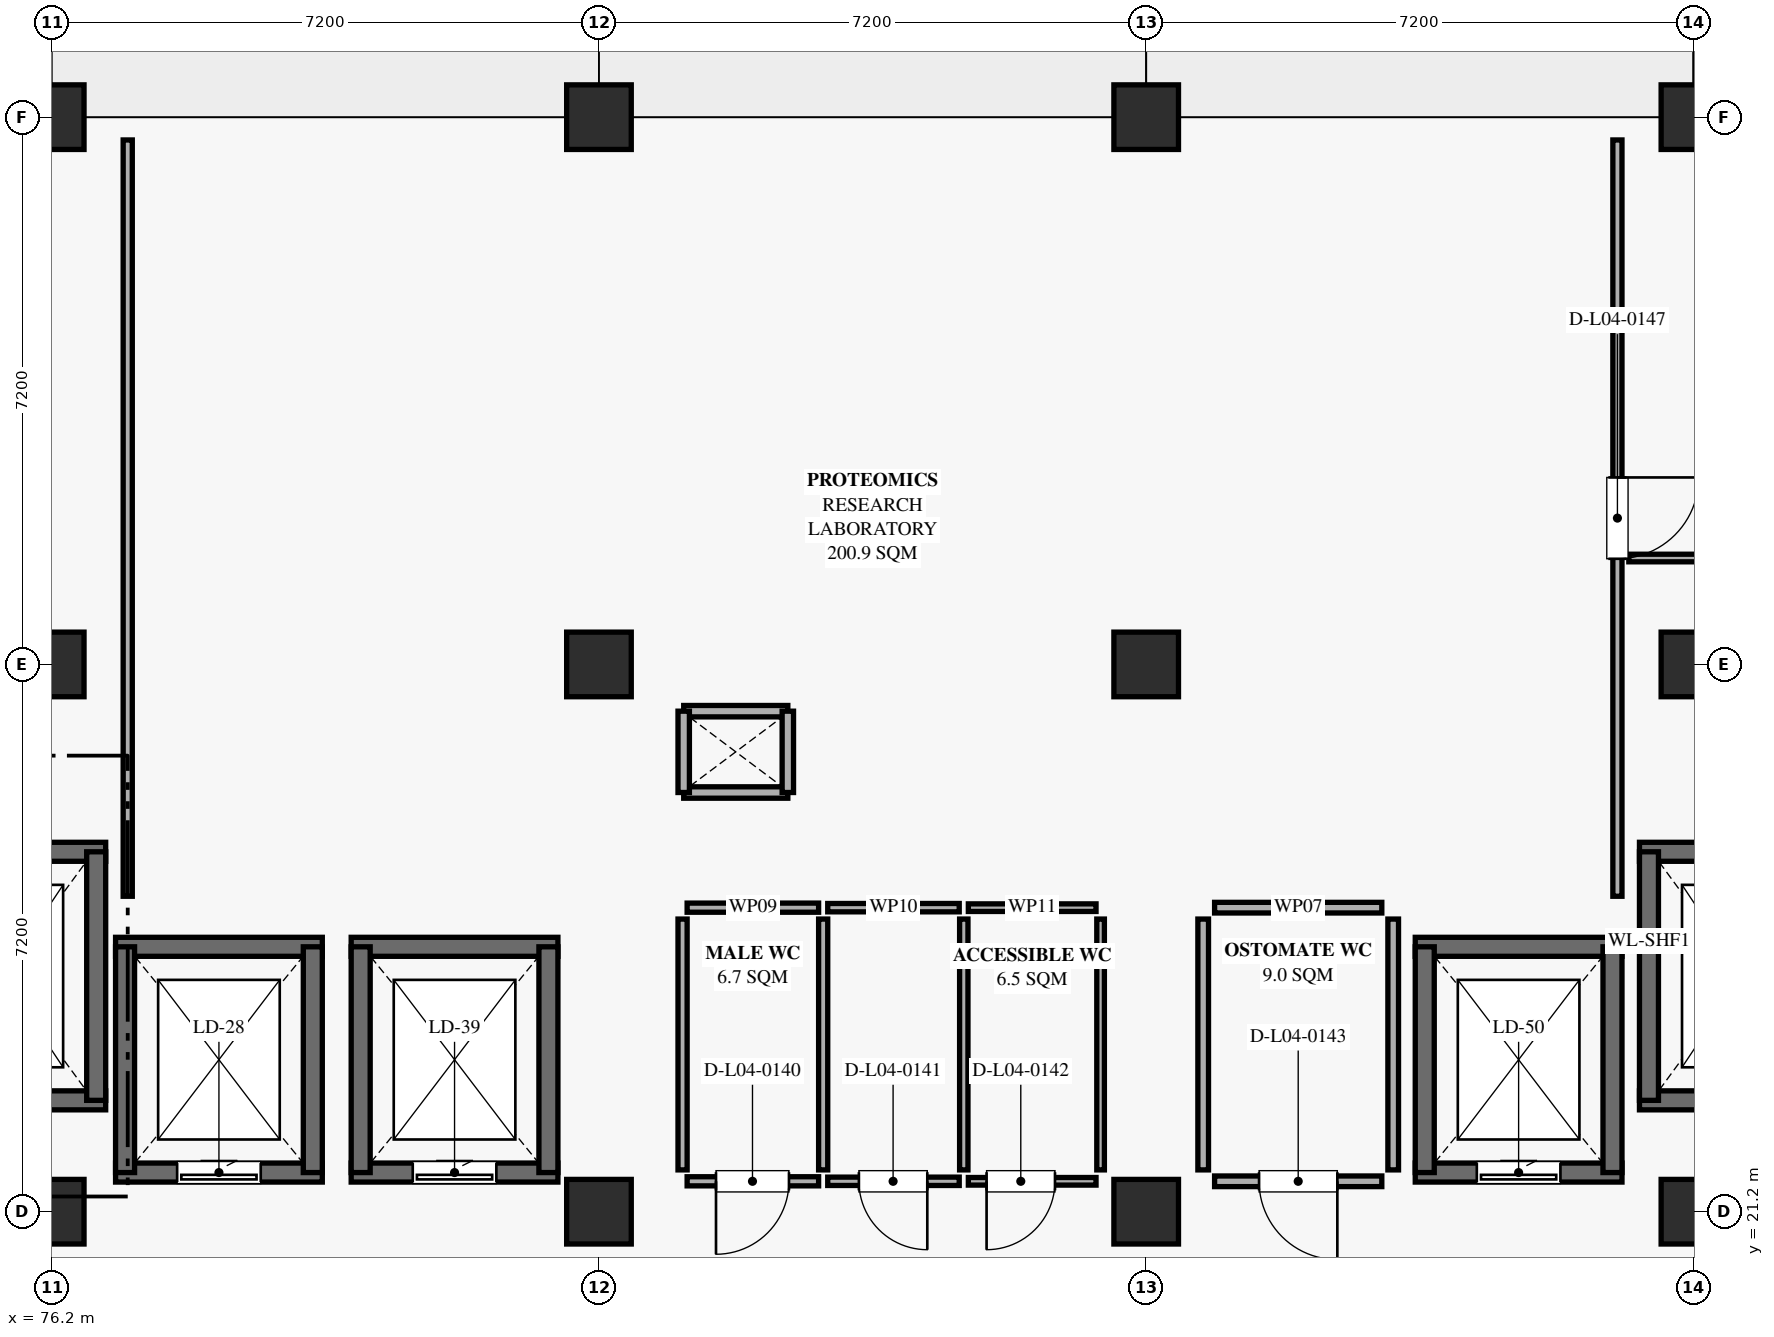
"""IFC4 building model, lengths in metres.
Left out: names, types, materials, properties, quantities, classifications, styles, units other than length and angle.
Written with IfcOpenShell. Run it as: python <this file> out.ifc"""

import sys

from ifc_helpers import new_model, si_unit, direction, frame, frame_2d, origin, origin_2d, place, context, subcontext, project, spatial, rectangle, extrude, element, fill, save


model = new_model("IFC4")
c1 = context("Model", 3, precision=1e-05, world=origin(), true_north=direction((0.0, 1.0)))
c2 = subcontext(c1, "Body", "Model", "MODEL_VIEW")
j1 = project(units=[si_unit("LENGTHUNIT", "METRE"), si_unit("PLANEANGLEUNIT", "RADIAN")], contexts=[c1])
p1 = place(None, origin())
s1 = spatial("IfcSite", under=j1, at=p1, CompositionType="ELEMENT")
p2 = place(p1, origin())
s2 = spatial("IfcBuilding", under=s1, at=p2, CompositionType="ELEMENT")
p3 = place(p2, frame((0.0, 0.0, 19.8)))
s3 = spatial("IfcBuildingStorey", under=s2, at=p3, CompositionType="ELEMENT", Elevation=19.8)
for number, where, z_axis, x_axis in (
    (1, (76.2, 21.2, 0.0), (0.0, 0.0, 1.0), (1.0, 0.0, 0.0)),
    (2, (83.4, 21.2, 0.0), (0.0, 0.0, 1.0), (1.0, 0.0, 0.0)),
    (3, (90.6, 21.2, 0.0), (0.0, 0.0, 1.0), (1.0, 0.0, 0.0)),
    (4, (97.8, 21.2, 0.0), (0.0, 0.0, 1.0), (1.0, 0.0, 0.0)),
    (5, (76.2, 28.4, 0.0), (0.0, 0.0, 1.0), (1.0, 0.0, 0.0)),
    (6, (83.4, 28.4, 0.0), (0.0, 0.0, 1.0), (1.0, 0.0, 0.0)),
    (7, (90.6, 28.4, 0.0), (0.0, 0.0, 1.0), (1.0, 0.0, 0.0)),
    (8, (97.8, 28.4, 0.0), (0.0, 0.0, 1.0), (1.0, 0.0, 0.0)),
    (9, (76.2, 35.6, 0.0), (0.0, 0.0, 1.0), (1.0, 0.0, 0.0)),
    (10, (83.4, 35.6, 0.0), (0.0, 0.0, 1.0), (1.0, 0.0, 0.0)),
    (11, (90.6, 35.6, 0.0), (0.0, 0.0, 1.0), (1.0, 0.0, 0.0)),
    (12, (97.8, 35.6, 0.0), (0.0, 0.0, 1.0), (1.0, 0.0, 0.0)),
):
    element("IfcColumn", number, at=place(p3, frame(where, z_axis=z_axis, x_axis=x_axis)), inside=s3, PredefinedType="COLUMN", context=c2, shape_type="SweptSolid", body=[
        extrude(rectangle(XDim=0.85, YDim=0.85, at=origin_2d()), origin(), (0.0, 0.0, 1.0), 4.5),
    ])
for number, where, z_axis, x_axis in (
    (13, (85.885, 26.715, 0.0), (0.0, 0.0, 1.0), (-1.0, 0.0, 0.0)),
    (14, (84.515, 27.785, 0.0), (0.0, 0.0, 1.0), (1.0, 0.0, 0.0)),
):
    element("IfcWall", number, at=place(p3, frame(where, z_axis=z_axis, x_axis=x_axis)), inside=s3, PredefinedType="PARTITIONING", context=c2, shape_type="SweptSolid", body=[
        extrude(rectangle(XDim=1.37, YDim=0.15, at=frame_2d((0.685, 0.0))), origin(), (0.0, 0.0, 1.0), 2.98),
    ])
for number, where, z_axis, x_axis in (
    (15, (84.515, 26.715, 0.0), (0.0, 0.0, 1.0), (0.0, 1.0, 0.0)),
    (16, (85.885, 27.785, 0.0), (0.0, 0.0, 1.0), (0.0, -1.0, 0.0)),
):
    element("IfcWall", number, at=place(p3, frame(where, z_axis=z_axis, x_axis=x_axis)), inside=s3, PredefinedType="PARTITIONING", context=c2, shape_type="SweptSolid", body=[
        extrude(rectangle(XDim=1.07, YDim=0.15, at=frame_2d((0.535, 0.0))), origin(), (0.0, 0.0, 1.0), 2.98),
    ])
for number, where, z_axis, x_axis in (
    (17, (76.91, 22.665, 0.0), (0.0, 0.0, 1.0), (-1.0, 0.0, 0.0)),
    (18, (74.19, 25.935, 0.0), (0.0, 0.0, 1.0), (1.0, 0.0, 0.0)),
):
    element("IfcWall", number, at=place(p3, frame(where, z_axis=z_axis, x_axis=x_axis)), inside=s3, PredefinedType="SHEAR", context=c2, shape_type="SweptSolid", body=[
        extrude(rectangle(XDim=2.72, YDim=0.25, at=frame_2d((1.36, 0.0))), origin(), (0.0, 0.0, 1.0), 4.23),
    ])
p4 = place(p3, frame((76.785, 25.935, 0.0), z_axis=(0.0, 0.0, 1.0), x_axis=(0.0, -1.0, 0.0)))
e19 = element("IfcWall", 19, at=p4, inside=s3, PredefinedType="SHEAR", context=c2, shape_type="SweptSolid", body=[
    extrude(rectangle(XDim=3.27, YDim=0.25, at=frame_2d((1.635, 0.0))), origin(), (0.0, 0.0, 1.0), 4.23),
])
for number, where, z_axis, x_axis in (
    (20, (99.81, 22.665, 0.0), (0.0, 0.0, 1.0), (-1.0, 0.0, 0.0)),
    (21, (97.09, 25.935, 0.0), (0.0, 0.0, 1.0), (1.0, 0.0, 0.0)),
):
    element("IfcWall", number, at=place(p3, frame(where, z_axis=z_axis, x_axis=x_axis)), inside=s3, PredefinedType="SHEAR", context=c2, shape_type="SweptSolid", body=[
        extrude(rectangle(XDim=2.72, YDim=0.25, at=frame_2d((1.36, 0.0))), origin(), (0.0, 0.0, 1.0), 4.23),
    ])
p5 = place(p3, frame((97.215, 22.665, 0.0), z_axis=(0.0, 0.0, 1.0), x_axis=(0.0, 1.0, 0.0)))
e22 = element("IfcWall", 22, at=p5, inside=s3, PredefinedType="SHEAR", context=c2, shape_type="SweptSolid", body=[
    extrude(rectangle(XDim=3.27, YDim=0.25, at=frame_2d((1.635, 0.0))), origin(), (0.0, 0.0, 1.0), 4.23),
])
p6 = place(p3, frame((79.76, 21.715, 0.0), z_axis=(0.0, 0.0, 1.0), x_axis=(-1.0, 0.0, 0.0)))
e23 = element("IfcWall", 23, at=p6, inside=s3, PredefinedType="SHEAR", context=c2, shape_type="SweptSolid", body=[
    extrude(rectangle(XDim=2.72, YDim=0.25, at=frame_2d((1.36, 0.0))), origin(), (0.0, 0.0, 1.0), 4.23),
])
p7 = place(p6, frame((0.81, 0.0, 0.0)))
e24 = element("IfcOpeningElement", 24, at=p7, cuts=e23, PredefinedType="OPENING", context=c2, shape_type="SweptSolid", body=[
    extrude(rectangle(XDim=1.1, YDim=2.2, at=frame_2d((0.55, 1.1))), frame((0.0, 0.135, 0.0), z_axis=(0.0, -1.0, 0.0), x_axis=(1.0, 0.0, 0.0)), (0.0, 0.0, 1.0), 0.27),
])
p8 = place(p3, frame((77.04, 24.685, 0.0), z_axis=(0.0, 0.0, 1.0), x_axis=(1.0, 0.0, 0.0)))
e25 = element("IfcWall", 25, at=p8, inside=s3, PredefinedType="SHEAR", context=c2, shape_type="SweptSolid", body=[
    extrude(rectangle(XDim=2.72, YDim=0.25, at=frame_2d((1.36, 0.0))), origin(), (0.0, 0.0, 1.0), 4.23),
])
for number, where, z_axis, x_axis in (
    (26, (77.165, 21.715, 0.0), (0.0, 0.0, 1.0), (0.0, 1.0, 0.0)),
    (27, (79.635, 24.685, 0.0), (0.0, 0.0, 1.0), (0.0, -1.0, 0.0)),
):
    element("IfcWall", number, at=place(p3, frame(where, z_axis=z_axis, x_axis=x_axis)), inside=s3, PredefinedType="SHEAR", context=c2, shape_type="SweptSolid", body=[
        extrude(rectangle(XDim=2.97, YDim=0.25, at=frame_2d((1.485, 0.0))), origin(), (0.0, 0.0, 1.0), 4.23),
    ])
p9 = place(p3, frame((82.86, 21.715, 0.0), z_axis=(0.0, 0.0, 1.0), x_axis=(-1.0, 0.0, 0.0)))
e28 = element("IfcWall", 28, at=p9, inside=s3, PredefinedType="SHEAR", context=c2, shape_type="SweptSolid", body=[
    extrude(rectangle(XDim=2.72, YDim=0.25, at=frame_2d((1.36, 0.0))), origin(), (0.0, 0.0, 1.0), 4.23),
])
p10 = place(p9, frame((0.81, 0.0, 0.0)))
e29 = element("IfcOpeningElement", 29, at=p10, cuts=e28, PredefinedType="OPENING", context=c2, shape_type="SweptSolid", body=[
    extrude(rectangle(XDim=1.1, YDim=2.2, at=frame_2d((0.55, 1.1))), frame((0.0, 0.135, 0.0), z_axis=(0.0, -1.0, 0.0), x_axis=(1.0, 0.0, 0.0)), (0.0, 0.0, 1.0), 0.27),
])
p11 = place(p3, frame((80.14, 24.685, 0.0), z_axis=(0.0, 0.0, 1.0), x_axis=(1.0, 0.0, 0.0)))
e30 = element("IfcWall", 30, at=p11, inside=s3, PredefinedType="SHEAR", context=c2, shape_type="SweptSolid", body=[
    extrude(rectangle(XDim=2.72, YDim=0.25, at=frame_2d((1.36, 0.0))), origin(), (0.0, 0.0, 1.0), 4.23),
])
for number, where, z_axis, x_axis in (
    (31, (80.265, 21.715, 0.0), (0.0, 0.0, 1.0), (0.0, 1.0, 0.0)),
    (32, (82.735, 24.685, 0.0), (0.0, 0.0, 1.0), (0.0, -1.0, 0.0)),
):
    element("IfcWall", number, at=place(p3, frame(where, z_axis=z_axis, x_axis=x_axis)), inside=s3, PredefinedType="SHEAR", context=c2, shape_type="SweptSolid", body=[
        extrude(rectangle(XDim=2.97, YDim=0.25, at=frame_2d((1.485, 0.0))), origin(), (0.0, 0.0, 1.0), 4.23),
    ])
p12 = place(p3, frame((96.86, 21.715, 0.0), z_axis=(0.0, 0.0, 1.0), x_axis=(-1.0, 0.0, 0.0)))
e33 = element("IfcWall", 33, at=p12, inside=s3, PredefinedType="SHEAR", context=c2, shape_type="SweptSolid", body=[
    extrude(rectangle(XDim=2.72, YDim=0.25, at=frame_2d((1.36, 0.0))), origin(), (0.0, 0.0, 1.0), 4.23),
])
p13 = place(p12, frame((0.81, 0.0, 0.0)))
e34 = element("IfcOpeningElement", 34, at=p13, cuts=e33, PredefinedType="OPENING", context=c2, shape_type="SweptSolid", body=[
    extrude(rectangle(XDim=1.1, YDim=2.2, at=frame_2d((0.55, 1.1))), frame((0.0, 0.135, 0.0), z_axis=(0.0, -1.0, 0.0), x_axis=(1.0, 0.0, 0.0)), (0.0, 0.0, 1.0), 0.27),
])
p14 = place(p3, frame((94.14, 24.685, 0.0), z_axis=(0.0, 0.0, 1.0), x_axis=(1.0, 0.0, 0.0)))
e35 = element("IfcWall", 35, at=p14, inside=s3, PredefinedType="SHEAR", context=c2, shape_type="SweptSolid", body=[
    extrude(rectangle(XDim=2.72, YDim=0.25, at=frame_2d((1.36, 0.0))), origin(), (0.0, 0.0, 1.0), 4.23),
])
for number, where, z_axis, x_axis in (
    (36, (94.265, 21.715, 0.0), (0.0, 0.0, 1.0), (0.0, 1.0, 0.0)),
    (37, (96.735, 24.685, 0.0), (0.0, 0.0, 1.0), (0.0, -1.0, 0.0)),
):
    element("IfcWall", number, at=place(p3, frame(where, z_axis=z_axis, x_axis=x_axis)), inside=s3, PredefinedType="SHEAR", context=c2, shape_type="SweptSolid", body=[
        extrude(rectangle(XDim=2.97, YDim=0.25, at=frame_2d((1.485, 0.0))), origin(), (0.0, 0.0, 1.0), 4.23),
    ])
p15 = place(p3, frame((86.29, 21.6, 0.0), z_axis=(0.0, 0.0, 1.0), x_axis=(-1.0, 0.0, 0.0)))
e38 = element("IfcWall", 38, at=p15, inside=s3, PredefinedType="PARTITIONING", context=c2, shape_type="SweptSolid", body=[
    extrude(rectangle(XDim=1.73, YDim=0.12, at=frame_2d((0.865, 0.0))), origin(), (0.0, 0.0, 1.0), 2.98),
])
p16 = place(p15, frame((0.39, 0.0, 0.0)))
e39 = element("IfcOpeningElement", 39, at=p16, cuts=e38, PredefinedType="OPENING", context=c2, shape_type="SweptSolid", body=[
    extrude(rectangle(XDim=0.96, YDim=2.22, at=frame_2d((0.48, 1.11))), frame((0.0, 0.07, 0.0), z_axis=(0.0, -1.0, 0.0), x_axis=(1.0, 0.0, 0.0)), (0.0, 0.0, 1.0), 0.14),
])
p17 = place(p3, frame((84.56, 25.2, 0.0), z_axis=(0.0, 0.0, 1.0), x_axis=(1.0, 0.0, 0.0)))
e40 = element("IfcWall", 40, at=p17, inside=s3, PredefinedType="PARTITIONING", context=c2, shape_type="SweptSolid", body=[
    extrude(rectangle(XDim=1.73, YDim=0.12, at=frame_2d((0.865, 0.0))), origin(), (0.0, 0.0, 1.0), 2.98),
])
for number, where, z_axis, x_axis in (
    (41, (84.5, 21.75, 0.0), (0.0, 0.0, 1.0), (0.0, 1.0, 0.0)),
    (42, (86.35, 25.05, 0.0), (0.0, 0.0, 1.0), (0.0, -1.0, 0.0)),
):
    element("IfcWall", number, at=place(p3, frame(where, z_axis=z_axis, x_axis=x_axis)), inside=s3, PredefinedType="PARTITIONING", context=c2, shape_type="SweptSolid", body=[
        extrude(rectangle(XDim=3.3, YDim=0.12, at=frame_2d((1.65, 0.0))), origin(), (0.0, 0.0, 1.0), 2.98),
    ])
p18 = place(p3, frame((88.14, 21.6, 0.0), z_axis=(0.0, 0.0, 1.0), x_axis=(-1.0, 0.0, 0.0)))
e43 = element("IfcWall", 43, at=p18, inside=s3, PredefinedType="PARTITIONING", context=c2, shape_type="SweptSolid", body=[
    extrude(rectangle(XDim=1.73, YDim=0.11, at=frame_2d((0.865, 0.0))), origin(), (0.0, 0.0, 1.0), 2.98),
])
p19 = place(p18, frame((0.42, 0.0, 0.0)))
e44 = element("IfcOpeningElement", 44, at=p19, cuts=e43, PredefinedType="OPENING", context=c2, shape_type="SweptSolid", body=[
    extrude(rectangle(XDim=0.9, YDim=2.05, at=frame_2d((0.45, 1.025))), frame((0.0, 0.065, 0.0), z_axis=(0.0, -1.0, 0.0), x_axis=(1.0, 0.0, 0.0)), (0.0, 0.0, 1.0), 0.13),
])
p20 = place(p3, frame((86.41, 25.2, 0.0), z_axis=(0.0, 0.0, 1.0), x_axis=(1.0, 0.0, 0.0)))
e45 = element("IfcWall", 45, at=p20, inside=s3, PredefinedType="PARTITIONING", context=c2, shape_type="SweptSolid", body=[
    extrude(rectangle(XDim=1.73, YDim=0.11, at=frame_2d((0.865, 0.0))), origin(), (0.0, 0.0, 1.0), 2.98),
])
p21 = place(p3, frame((88.2, 25.05, 0.0), z_axis=(0.0, 0.0, 1.0), x_axis=(0.0, -1.0, 0.0)))
e46 = element("IfcWall", 46, at=p21, inside=s3, PredefinedType="PARTITIONING", context=c2, shape_type="SweptSolid", body=[
    extrude(rectangle(XDim=3.3, YDim=0.11, at=frame_2d((1.65, 0.0))), origin(), (0.0, 0.0, 1.0), 2.98),
])
p22 = place(p3, frame((89.94, 21.6, 0.0), z_axis=(0.0, 0.0, 1.0), x_axis=(-1.0, 0.0, 0.0)))
e47 = element("IfcWall", 47, at=p22, inside=s3, PredefinedType="PARTITIONING", context=c2, shape_type="SweptSolid", body=[
    extrude(rectangle(XDim=1.68, YDim=0.1, at=frame_2d((0.84, 0.0))), origin(), (0.0, 0.0, 1.0), 2.98),
])
p23 = place(p22, frame((0.54, 0.0, 0.0)))
e48 = element("IfcOpeningElement", 48, at=p23, cuts=e47, PredefinedType="OPENING", context=c2, shape_type="SweptSolid", body=[
    extrude(rectangle(XDim=0.9, YDim=2.1, at=frame_2d((0.45, 1.05))), frame((0.0, 0.06, 0.0), z_axis=(0.0, -1.0, 0.0), x_axis=(1.0, 0.0, 0.0)), (0.0, 0.0, 1.0), 0.12),
])
p24 = place(p3, frame((88.26, 25.2, 0.0), z_axis=(0.0, 0.0, 1.0), x_axis=(1.0, 0.0, 0.0)))
e49 = element("IfcWall", 49, at=p24, inside=s3, PredefinedType="PARTITIONING", context=c2, shape_type="SweptSolid", body=[
    extrude(rectangle(XDim=1.68, YDim=0.1, at=frame_2d((0.84, 0.0))), origin(), (0.0, 0.0, 1.0), 2.98),
])
p25 = place(p3, frame((90.0, 25.05, 0.0), z_axis=(0.0, 0.0, 1.0), x_axis=(0.0, -1.0, 0.0)))
e50 = element("IfcWall", 50, at=p25, inside=s3, PredefinedType="PARTITIONING", context=c2, shape_type="SweptSolid", body=[
    extrude(rectangle(XDim=3.3, YDim=0.1, at=frame_2d((1.65, 0.0))), origin(), (0.0, 0.0, 1.0), 2.98),
])
p26 = place(p3, frame((93.7, 21.6, 0.0), z_axis=(0.0, 0.0, 1.0), x_axis=(-1.0, 0.0, 0.0)))
e51 = element("IfcWall", 51, at=p26, inside=s3, PredefinedType="PARTITIONING", context=c2, shape_type="SweptSolid", body=[
    extrude(rectangle(XDim=2.2, YDim=0.14, at=frame_2d((1.1, 0.0))), origin(), (0.0, 0.0, 1.0), 2.98),
])
p27 = place(p26, frame((0.585, 0.0, 0.0)))
e52 = element("IfcOpeningElement", 52, at=p27, cuts=e51, PredefinedType="OPENING", context=c2, shape_type="SweptSolid", body=[
    extrude(rectangle(XDim=1.03, YDim=2.16, at=frame_2d((0.515, 1.08))), frame((0.0, 0.08, 0.0), z_axis=(0.0, -1.0, 0.0), x_axis=(1.0, 0.0, 0.0)), (0.0, 0.0, 1.0), 0.16),
])
p28 = place(p3, frame((91.5, 25.2, 0.0), z_axis=(0.0, 0.0, 1.0), x_axis=(1.0, 0.0, 0.0)))
e53 = element("IfcWall", 53, at=p28, inside=s3, PredefinedType="PARTITIONING", context=c2, shape_type="SweptSolid", body=[
    extrude(rectangle(XDim=2.2, YDim=0.14, at=frame_2d((1.1, 0.0))), origin(), (0.0, 0.0, 1.0), 2.98),
])
for number, where, z_axis, x_axis in (
    (54, (91.35, 21.75, 0.0), (0.0, 0.0, 1.0), (0.0, 1.0, 0.0)),
    (55, (93.85, 25.05, 0.0), (0.0, 0.0, 1.0), (0.0, -1.0, 0.0)),
):
    element("IfcWall", number, at=place(p3, frame(where, z_axis=z_axis, x_axis=x_axis)), inside=s3, PredefinedType="PARTITIONING", context=c2, shape_type="SweptSolid", body=[
        extrude(rectangle(XDim=3.3, YDim=0.14, at=frame_2d((1.65, 0.0))), origin(), (0.0, 0.0, 1.0), 2.98),
    ])
p29 = place(p3, frame((77.2, 25.35, 0.0), z_axis=(0.0, 0.0, 1.0), x_axis=(0.0, 1.0, 0.0)))
e56 = element("IfcWall", 56, at=p29, inside=s3, PredefinedType="PARTITIONING", context=c2, shape_type="SweptSolid", body=[
    extrude(rectangle(XDim=9.95, YDim=0.12, at=frame_2d((4.975, 0.0))), origin(), (0.0, 0.0, 1.0), 2.98),
])
p30 = place(p3, frame((96.8, 35.3, 0.0), z_axis=(0.0, 0.0, 1.0), x_axis=(0.0, -1.0, 0.0)))
e57 = element("IfcWall", 57, at=p30, inside=s3, PredefinedType="PARTITIONING", context=c2, shape_type="SweptSolid", body=[
    extrude(rectangle(XDim=9.95, YDim=0.12, at=frame_2d((4.975, 0.0))), origin(), (0.0, 0.0, 1.0), 2.98),
])
p31 = place(p30, frame((4.44, 0.0, 0.0)))
e58 = element("IfcOpeningElement", 58, at=p31, cuts=e57, PredefinedType="OPENING", context=c2, shape_type="SweptSolid", body=[
    extrude(rectangle(XDim=1.07, YDim=2.16, at=frame_2d((0.535, 1.08))), frame((0.0, 0.07, 0.0), z_axis=(0.0, -1.0, 0.0), x_axis=(1.0, 0.0, 0.0)), (0.0, 0.0, 1.0), 0.14),
])
p32 = place(p3, frame((111.03, 29.8, 0.0), z_axis=(0.0, 0.0, 1.0), x_axis=(-1.0, 0.0, 0.0)))
e59 = element("IfcWall", 59, at=p32, inside=s3, PredefinedType="PARTITIONING", context=c2, shape_type="SweptSolid", body=[
    extrude(rectangle(XDim=14.08, YDim=0.1, at=frame_2d((7.04, 0.0))), origin(), (0.0, 0.0, 1.0), 2.98),
])
p33 = place(p32, frame((9.095, 0.0, 0.0)))
e60 = element("IfcOpeningElement", 60, at=p33, cuts=e59, PredefinedType="OPENING", context=c2, shape_type="SweptSolid", body=[
    extrude(rectangle(XDim=1.07, YDim=2.22, at=frame_2d((0.535, 1.11))), frame((0.0, 0.06, 0.0), z_axis=(0.0, -1.0, 0.0), x_axis=(1.0, 0.0, 0.0)), (0.0, 0.0, 1.0), 0.12),
])
p34 = place(p7, origin())
e61 = element("IfcDoor", 61, at=p34, inside=s3, OperationType="SLIDING_TO_LEFT", PredefinedType="DOOR", context=c2, shape_type="SweptSolid", body=[
    extrude(rectangle(XDim=1.1, YDim=2.2, at=frame_2d((0.55, 1.1))), frame((0.0, 0.025, 0.0), z_axis=(0.0, -1.0, 0.0), x_axis=(1.0, 0.0, 0.0)), (0.0, 0.0, 1.0), 0.05),
])
fill(e24, e61)
p35 = place(p10, origin())
e62 = element("IfcDoor", 62, at=p35, inside=s3, OperationType="SLIDING_TO_LEFT", PredefinedType="DOOR", context=c2, shape_type="SweptSolid", body=[
    extrude(rectangle(XDim=1.1, YDim=2.2, at=frame_2d((0.55, 1.1))), frame((0.0, 0.025, 0.0), z_axis=(0.0, -1.0, 0.0), x_axis=(1.0, 0.0, 0.0)), (0.0, 0.0, 1.0), 0.05),
])
fill(e29, e62)
p36 = place(p13, origin())
e63 = element("IfcDoor", 63, at=p36, inside=s3, OperationType="SLIDING_TO_LEFT", PredefinedType="DOOR", context=c2, shape_type="SweptSolid", body=[
    extrude(rectangle(XDim=1.1, YDim=2.2, at=frame_2d((0.55, 1.1))), frame((0.0, 0.025, 0.0), z_axis=(0.0, -1.0, 0.0), x_axis=(1.0, 0.0, 0.0)), (0.0, 0.0, 1.0), 0.05),
])
fill(e34, e63)
p37 = place(p16, origin())
e64 = element("IfcDoor", 64, at=p37, inside=s3, OperationType="SINGLE_SWING_RIGHT", PredefinedType="DOOR", context=c2, shape_type="SweptSolid", body=[
    extrude(rectangle(XDim=0.96, YDim=2.22, at=frame_2d((0.48, 1.11))), frame((0.0, 0.025, 0.0), z_axis=(0.0, -1.0, 0.0), x_axis=(1.0, 0.0, 0.0)), (0.0, 0.0, 1.0), 0.05),
])
fill(e39, e64)
p38 = place(p19, origin())
e65 = element("IfcDoor", 65, at=p38, inside=s3, OperationType="SINGLE_SWING_LEFT", PredefinedType="DOOR", context=c2, shape_type="SweptSolid", body=[
    extrude(rectangle(XDim=0.9, YDim=2.05, at=frame_2d((0.45, 1.025))), frame((0.0, 0.025, 0.0), z_axis=(0.0, -1.0, 0.0), x_axis=(1.0, 0.0, 0.0)), (0.0, 0.0, 1.0), 0.05),
])
fill(e44, e65)
p39 = place(p23, origin())
e66 = element("IfcDoor", 66, at=p39, inside=s3, OperationType="SINGLE_SWING_RIGHT", PredefinedType="DOOR", context=c2, shape_type="SweptSolid", body=[
    extrude(rectangle(XDim=0.9, YDim=2.1, at=frame_2d((0.45, 1.05))), frame((0.0, 0.025, 0.0), z_axis=(0.0, -1.0, 0.0), x_axis=(1.0, 0.0, 0.0)), (0.0, 0.0, 1.0), 0.05),
])
fill(e48, e66)
p40 = place(p27, origin())
e67 = element("IfcDoor", 67, at=p40, inside=s3, OperationType="SINGLE_SWING_LEFT", PredefinedType="DOOR", context=c2, shape_type="SweptSolid", body=[
    extrude(rectangle(XDim=1.03, YDim=2.16, at=frame_2d((0.515, 1.08))), frame((0.0, 0.025, 0.0), z_axis=(0.0, -1.0, 0.0), x_axis=(1.0, 0.0, 0.0)), (0.0, 0.0, 1.0), 0.05),
])
fill(e52, e67)
p41 = place(p31, origin())
e68 = element("IfcDoor", 68, at=p41, inside=s3, OperationType="SINGLE_SWING_LEFT", PredefinedType="DOOR", context=c2, shape_type="SweptSolid", body=[
    extrude(rectangle(XDim=1.07, YDim=2.16, at=frame_2d((0.535, 1.08))), frame((0.0, 0.025, 0.0), z_axis=(0.0, -1.0, 0.0), x_axis=(1.0, 0.0, 0.0)), (0.0, 0.0, 1.0), 0.05),
])
fill(e58, e68)
save(model, sys.argv[1])
